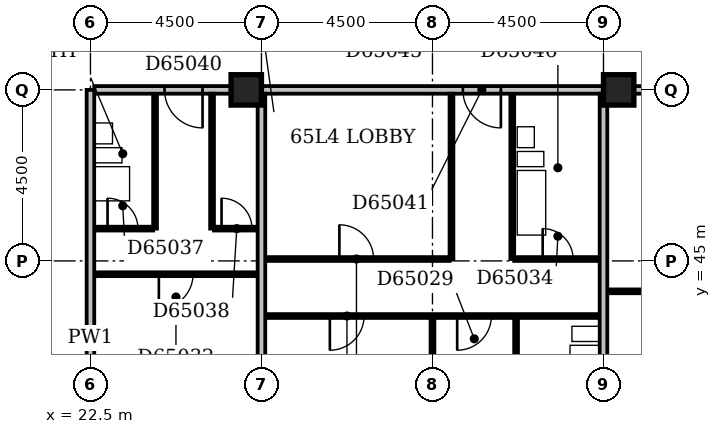
"""IFC4 building model, lengths in metres.
Left out: names, types, materials, properties, quantities, classifications, styles, units other than length and angle.
Written with IfcOpenShell. Run it as: python <this file> out.ifc"""

import sys

from ifc_helpers import new_model, si_unit, direction, frame, frame_2d, origin, origin_2d, place, context, subcontext, project, spatial, rectangle, extrude, element, fill, save


model = new_model("IFC4")
c1 = context("Model", 3, precision=1e-05, world=origin(), true_north=direction((0.0, 1.0)))
c2 = subcontext(c1, "Body", "Model", "MODEL_VIEW")
j1 = project(units=[si_unit("LENGTHUNIT", "METRE"), si_unit("PLANEANGLEUNIT", "RADIAN")], contexts=[c1])
p1 = place(None, origin())
s1 = spatial("IfcSite", under=j1, at=p1, CompositionType="ELEMENT")
p2 = place(p1, origin())
s2 = spatial("IfcBuilding", under=s1, at=p2, CompositionType="ELEMENT")
p3 = place(p2, frame((0.0, 0.0, 251.0)))
s3 = spatial("IfcBuildingStorey", under=s2, at=p3, CompositionType="ELEMENT", Elevation=251.0)
for number, where, z_axis, x_axis in (
    (1, (26.6, 49.5, -0.3), (0.0, 0.0, 1.0), (1.0, 0.0, 0.0)),
    (2, (36.4, 49.5, -0.3), (0.0, 0.0, 1.0), (1.0, 0.0, 0.0)),
):
    element("IfcColumn", number, at=place(p3, frame(where, z_axis=z_axis, x_axis=x_axis)), inside=s3, PredefinedType="COLUMN", context=c2, shape_type="SweptSolid", body=[
        extrude(rectangle(XDim=0.8, YDim=0.8, at=origin_2d()), origin(), (0.0, 0.0, 1.0), 3.6),
    ])
p4 = place(p3, frame((22.5, 36.45, 0.0), z_axis=(0.0, 0.0, 1.0), x_axis=(0.0, 1.0, 0.0)))
e3 = element("IfcWall", 3, at=p4, inside=s3, PredefinedType="PARTITIONING", context=c2, shape_type="SweptSolid", body=[
    extrude(rectangle(XDim=13.05, YDim=0.2, at=frame_2d((6.525, 0.0))), origin(), (0.0, 0.0, 1.0), 3.3),
])
p5 = place(p3, frame((27.0, 36.45, 0.0), z_axis=(0.0, 0.0, 1.0), x_axis=(0.0, 1.0, 0.0)))
e4 = element("IfcWall", 4, at=p5, inside=s3, PredefinedType="PARTITIONING", context=c2, shape_type="SweptSolid", body=[
    extrude(rectangle(XDim=12.95, YDim=0.2, at=frame_2d((6.475, 0.0))), origin(), (0.0, 0.0, 1.0), 3.3),
])
p6 = place(p3, frame((31.5, 36.45, 0.0), z_axis=(0.0, 0.0, 1.0), x_axis=(0.0, 1.0, 0.0)))
e5 = element("IfcWall", 5, at=p6, inside=s3, PredefinedType="PARTITIONING", context=c2, shape_type="SweptSolid", body=[
    extrude(rectangle(XDim=7.05, YDim=0.1, at=frame_2d((3.525, 0.0))), origin(), (0.0, 0.0, 1.0), 3.3),
])
p7 = place(p3, frame((36.0, 36.45, 0.0), z_axis=(0.0, 0.0, 1.0), x_axis=(0.0, 1.0, 0.0)))
e6 = element("IfcWall", 6, at=p7, inside=s3, PredefinedType="PARTITIONING", context=c2, shape_type="SweptSolid", body=[
    extrude(rectangle(XDim=12.95, YDim=0.2, at=frame_2d((6.475, 0.0))), origin(), (0.0, 0.0, 1.0), 3.3),
])
p8 = place(p3, frame((33.7, 40.65, 0.0), z_axis=(0.0, 0.0, 1.0), x_axis=(0.0, 1.0, 0.0)))
e7 = element("IfcWall", 7, at=p8, inside=s3, PredefinedType="PLUMBINGWALL", context=c2, shape_type="SweptSolid", body=[
    extrude(rectangle(XDim=2.85, YDim=0.1, at=frame_2d((1.425, 0.0))), origin(), (0.0, 0.0, 1.0), 3.3),
])
p9 = place(p8, frame((1.05, 0.0, 0.0)))
e8 = element("IfcOpeningElement", 8, at=p9, cuts=e7, PredefinedType="OPENING", context=c2, shape_type="SweptSolid", body=[
    extrude(rectangle(XDim=0.8, YDim=2.1, at=frame_2d((0.4, 1.05))), frame((0.0, 0.062, 0.0), z_axis=(0.0, -1.0, 0.0), x_axis=(1.0, 0.0, 0.0)), (0.0, 0.0, 1.0), 0.124),
])
p10 = place(p3, frame((27.1, 43.55, 0.0), z_axis=(0.0, 0.0, 1.0), x_axis=(1.0, 0.0, 0.0)))
e9 = element("IfcWall", 9, at=p10, inside=s3, PredefinedType="PARTITIONING", context=c2, shape_type="SweptSolid", body=[
    extrude(rectangle(XDim=8.8, YDim=0.1, at=frame_2d((4.4, 0.0))), origin(), (0.0, 0.0, 1.0), 3.3),
])
p11 = place(p10, frame((1.7, 0.0, 0.0)))
e10 = element("IfcOpeningElement", 10, at=p11, cuts=e9, PredefinedType="OPENING", context=c2, shape_type="SweptSolid", body=[
    extrude(rectangle(XDim=0.9, YDim=2.1, at=frame_2d((0.45, 1.05))), frame((0.0, 0.062, 0.0), z_axis=(0.0, -1.0, 0.0), x_axis=(1.0, 0.0, 0.0)), (0.0, 0.0, 1.0), 0.124),
])
p12 = place(p10, frame((5.05, 0.0, 0.0)))
e11 = element("IfcOpeningElement", 11, at=p12, cuts=e9, PredefinedType="OPENING", context=c2, shape_type="SweptSolid", body=[
    extrude(rectangle(XDim=0.9, YDim=2.1, at=frame_2d((0.45, 1.05))), frame((0.0, 0.062, 0.0), z_axis=(0.0, -1.0, 0.0), x_axis=(1.0, 0.0, 0.0)), (0.0, 0.0, 1.0), 0.124),
])
p13 = place(p3, frame((36.1, 44.2, 0.0), z_axis=(0.0, 0.0, 1.0), x_axis=(1.0, 0.0, 0.0)))
e12 = element("IfcWall", 12, at=p13, inside=s3, PredefinedType="PARTITIONING", context=c2, shape_type="SweptSolid", body=[
    extrude(rectangle(XDim=9.5, YDim=0.1, at=frame_2d((4.75, 0.0))), origin(), (0.0, 0.0, 1.0), 3.3),
])
p14 = place(p13, frame((1.7, 0.0, 0.0)))
e13 = element("IfcOpeningElement", 13, at=p14, cuts=e12, PredefinedType="OPENING", context=c2, shape_type="SweptSolid", body=[
    extrude(rectangle(XDim=0.9, YDim=2.1, at=frame_2d((0.45, 1.05))), frame((0.0, 0.062, 0.0), z_axis=(0.0, -1.0, 0.0), x_axis=(1.0, 0.0, 0.0)), (0.0, 0.0, 1.0), 0.124),
])
p15 = place(p13, frame((6.2, 0.0, 0.0)))
e14 = element("IfcOpeningElement", 14, at=p15, cuts=e12, PredefinedType="OPENING", context=c2, shape_type="SweptSolid", body=[
    extrude(rectangle(XDim=0.9, YDim=2.1, at=frame_2d((0.45, 1.05))), frame((0.0, 0.062, 0.0), z_axis=(0.0, -1.0, 0.0), x_axis=(1.0, 0.0, 0.0)), (0.0, 0.0, 1.0), 0.124),
])
p16 = place(p3, frame((22.6, 44.65, 0.0), z_axis=(0.0, 0.0, 1.0), x_axis=(1.0, 0.0, 0.0)))
e15 = element("IfcWall", 15, at=p16, inside=s3, PredefinedType="PARTITIONING", context=c2, shape_type="SweptSolid", body=[
    extrude(rectangle(XDim=4.3, YDim=0.1, at=frame_2d((2.15, 0.0))), origin(), (0.0, 0.0, 1.0), 3.3),
])
p17 = place(p16, frame((1.7, 0.0, 0.0)))
e16 = element("IfcOpeningElement", 16, at=p17, cuts=e15, PredefinedType="OPENING", context=c2, shape_type="SweptSolid", body=[
    extrude(rectangle(XDim=0.9, YDim=2.1, at=frame_2d((0.45, 1.05))), frame((0.0, 0.062, 0.0), z_axis=(0.0, -1.0, 0.0), x_axis=(1.0, 0.0, 0.0)), (0.0, 0.0, 1.0), 0.124),
])
p18 = place(p3, frame((27.1, 45.05, 0.0), z_axis=(0.0, 0.0, 1.0), x_axis=(1.0, 0.0, 0.0)))
e17 = element("IfcWall", 17, at=p18, inside=s3, PredefinedType="PARTITIONING", context=c2, shape_type="SweptSolid", body=[
    extrude(rectangle(XDim=4.85, YDim=0.1, at=frame_2d((2.425, 0.0))), origin(), (0.0, 0.0, 1.0), 3.3),
])
p19 = place(p18, frame((1.95, 0.0, 0.0)))
e18 = element("IfcOpeningElement", 18, at=p19, cuts=e17, PredefinedType="OPENING", context=c2, shape_type="SweptSolid", body=[
    extrude(rectangle(XDim=0.9, YDim=2.1, at=frame_2d((0.45, 1.05))), frame((0.0, 0.062, 0.0), z_axis=(0.0, -1.0, 0.0), x_axis=(1.0, 0.0, 0.0)), (0.0, 0.0, 1.0), 0.124),
])
p20 = place(p3, frame((32.0, 45.05, 0.0), z_axis=(0.0, 0.0, 1.0), x_axis=(0.0, 1.0, 0.0)))
e19 = element("IfcWall", 19, at=p20, inside=s3, PredefinedType="PARTITIONING", context=c2, shape_type="SweptSolid", body=[
    extrude(rectangle(XDim=4.35, YDim=0.1, at=frame_2d((2.175, 0.0))), origin(), (0.0, 0.0, 1.0), 3.3),
])
p21 = place(p3, frame((33.6, 45.05, 0.0), z_axis=(0.0, 0.0, 1.0), x_axis=(0.0, 1.0, 0.0)))
e20 = element("IfcWall", 20, at=p21, inside=s3, PredefinedType="PLUMBINGWALL", context=c2, shape_type="SweptSolid", body=[
    extrude(rectangle(XDim=4.35, YDim=0.1, at=frame_2d((2.175, 0.0))), origin(), (0.0, 0.0, 1.0), 3.3),
])
p22 = place(p3, frame((33.65, 45.05, 0.0), z_axis=(0.0, 0.0, 1.0), x_axis=(1.0, 0.0, 0.0)))
e21 = element("IfcWall", 21, at=p22, inside=s3, PredefinedType="PARTITIONING", context=c2, shape_type="SweptSolid", body=[
    extrude(rectangle(XDim=2.25, YDim=0.1, at=frame_2d((1.125, 0.0))), origin(), (0.0, 0.0, 1.0), 3.3),
])
p23 = place(p22, frame((0.75, 0.0, 0.0)))
e22 = element("IfcOpeningElement", 22, at=p23, cuts=e21, PredefinedType="OPENING", context=c2, shape_type="SweptSolid", body=[
    extrude(rectangle(XDim=0.8, YDim=2.1, at=frame_2d((0.4, 1.05))), frame((0.0, 0.062, 0.0), z_axis=(0.0, -1.0, 0.0), x_axis=(1.0, 0.0, 0.0)), (0.0, 0.0, 1.0), 0.124),
])
p24 = place(p3, frame((22.6, 45.85, 0.0), z_axis=(0.0, 0.0, 1.0), x_axis=(1.0, 0.0, 0.0)))
e23 = element("IfcWall", 23, at=p24, inside=s3, PredefinedType="PARTITIONING", context=c2, shape_type="SweptSolid", body=[
    extrude(rectangle(XDim=1.55, YDim=0.1, at=frame_2d((0.775, 0.0))), origin(), (0.0, 0.0, 1.0), 3.3),
])
p25 = place(p24, frame((0.35, 0.0, 0.0)))
e24 = element("IfcOpeningElement", 24, at=p25, cuts=e23, PredefinedType="OPENING", context=c2, shape_type="SweptSolid", body=[
    extrude(rectangle(XDim=0.8, YDim=2.1, at=frame_2d((0.4, 1.05))), frame((0.0, 0.062, 0.0), z_axis=(0.0, -1.0, 0.0), x_axis=(1.0, 0.0, 0.0)), (0.0, 0.0, 1.0), 0.124),
])
p26 = place(p3, frame((24.2, 45.85, 0.0), z_axis=(0.0, 0.0, 1.0), x_axis=(0.0, 1.0, 0.0)))
e25 = element("IfcWall", 25, at=p26, inside=s3, PredefinedType="PLUMBINGWALL", context=c2, shape_type="SweptSolid", body=[
    extrude(rectangle(XDim=3.55, YDim=0.1, at=frame_2d((1.775, 0.0))), origin(), (0.0, 0.0, 1.0), 3.3),
])
p27 = place(p3, frame((25.7, 45.85, 0.0), z_axis=(0.0, 0.0, 1.0), x_axis=(0.0, 1.0, 0.0)))
e26 = element("IfcWall", 26, at=p27, inside=s3, PredefinedType="PARTITIONING", context=c2, shape_type="SweptSolid", body=[
    extrude(rectangle(XDim=3.55, YDim=0.1, at=frame_2d((1.775, 0.0))), origin(), (0.0, 0.0, 1.0), 3.3),
])
p28 = place(p3, frame((25.75, 45.85, 0.0), z_axis=(0.0, 0.0, 1.0), x_axis=(1.0, 0.0, 0.0)))
e27 = element("IfcWall", 27, at=p28, inside=s3, PredefinedType="PARTITIONING", context=c2, shape_type="SweptSolid", body=[
    extrude(rectangle(XDim=1.15, YDim=0.1, at=frame_2d((0.575, 0.0))), origin(), (0.0, 0.0, 1.0), 3.3),
])
p29 = place(p28, frame((0.2, 0.0, 0.0)))
e28 = element("IfcOpeningElement", 28, at=p29, cuts=e27, PredefinedType="OPENING", context=c2, shape_type="SweptSolid", body=[
    extrude(rectangle(XDim=0.8, YDim=2.1, at=frame_2d((0.4, 1.05))), frame((0.0, 0.062, 0.0), z_axis=(0.0, -1.0, 0.0), x_axis=(1.0, 0.0, 0.0)), (0.0, 0.0, 1.0), 0.124),
])
p30 = place(p3, frame((22.6, 49.5, 0.0), z_axis=(0.0, 0.0, 1.0), x_axis=(1.0, 0.0, 0.0)))
e29 = element("IfcWall", 29, at=p30, inside=s3, PredefinedType="PARTITIONING", context=c2, shape_type="SweptSolid", body=[
    extrude(rectangle(XDim=21.95, YDim=0.2, at=frame_2d((10.975, 0.0))), origin(), (0.0, 0.0, 1.0), 3.3),
])
p31 = place(p30, frame((1.85, 0.0, 0.0)))
e30 = element("IfcOpeningElement", 30, at=p31, cuts=e29, PredefinedType="OPENING", context=c2, shape_type="SweptSolid", body=[
    extrude(rectangle(XDim=1.0, YDim=2.1, at=frame_2d((0.5, 1.05))), frame((0.0, 0.112, 0.0), z_axis=(0.0, -1.0, 0.0), x_axis=(1.0, 0.0, 0.0)), (0.0, 0.0, 1.0), 0.224),
])
p32 = place(p30, frame((9.7, 0.0, 0.0)))
e31 = element("IfcOpeningElement", 31, at=p32, cuts=e29, PredefinedType="OPENING", context=c2, shape_type="SweptSolid", body=[
    extrude(rectangle(XDim=1.0, YDim=2.1, at=frame_2d((0.5, 1.05))), frame((0.0, 0.112, 0.0), z_axis=(0.0, -1.0, 0.0), x_axis=(1.0, 0.0, 0.0)), (0.0, 0.0, 1.0), 0.224),
])
p33 = place(p30, frame((15.05, 0.0, 0.0)))
e32 = element("IfcOpeningElement", 32, at=p33, cuts=e29, PredefinedType="OPENING", context=c2, shape_type="SweptSolid", body=[
    extrude(rectangle(XDim=1.0, YDim=2.1, at=frame_2d((0.5, 1.05))), frame((0.0, 0.112, 0.0), z_axis=(0.0, -1.0, 0.0), x_axis=(1.0, 0.0, 0.0)), (0.0, 0.0, 1.0), 0.224),
])
p34 = place(p11, frame((0.9, 0.0, 0.0), z_axis=(0.0, 0.0, 1.0), x_axis=(-1.0, 0.0, 0.0)))
e33 = element("IfcDoor", 33, at=p34, inside=s3, OperationType="SINGLE_SWING_RIGHT", PredefinedType="DOOR", context=c2, shape_type="SweptSolid", body=[
    extrude(rectangle(XDim=0.9, YDim=2.1, at=frame_2d((0.45, 1.05))), frame((0.0, 0.025, 0.0), z_axis=(0.0, -1.0, 0.0), x_axis=(1.0, 0.0, 0.0)), (0.0, 0.0, 1.0), 0.05),
])
fill(e10, e33)
p35 = place(p12, frame((0.9, 0.0, 0.0), z_axis=(0.0, 0.0, 1.0), x_axis=(-1.0, 0.0, 0.0)))
e34 = element("IfcDoor", 34, at=p35, inside=s3, OperationType="SINGLE_SWING_RIGHT", PredefinedType="DOOR", context=c2, shape_type="SweptSolid", body=[
    extrude(rectangle(XDim=0.9, YDim=2.1, at=frame_2d((0.45, 1.05))), frame((0.0, 0.025, 0.0), z_axis=(0.0, -1.0, 0.0), x_axis=(1.0, 0.0, 0.0)), (0.0, 0.0, 1.0), 0.05),
])
fill(e11, e34)
p36 = place(p17, frame((0.9, 0.0, 0.0), z_axis=(0.0, 0.0, 1.0), x_axis=(-1.0, 0.0, 0.0)))
e35 = element("IfcDoor", 35, at=p36, inside=s3, OperationType="SINGLE_SWING_RIGHT", PredefinedType="DOOR", context=c2, shape_type="SweptSolid", body=[
    extrude(rectangle(XDim=0.9, YDim=2.1, at=frame_2d((0.45, 1.05))), frame((0.0, 0.025, 0.0), z_axis=(0.0, -1.0, 0.0), x_axis=(1.0, 0.0, 0.0)), (0.0, 0.0, 1.0), 0.05),
])
fill(e16, e35)
p37 = place(p19, origin())
e36 = element("IfcDoor", 36, at=p37, inside=s3, OperationType="SINGLE_SWING_LEFT", PredefinedType="DOOR", context=c2, shape_type="SweptSolid", body=[
    extrude(rectangle(XDim=0.9, YDim=2.1, at=frame_2d((0.45, 1.05))), frame((0.0, 0.025, 0.0), z_axis=(0.0, -1.0, 0.0), x_axis=(1.0, 0.0, 0.0)), (0.0, 0.0, 1.0), 0.05),
])
fill(e18, e36)
p38 = place(p23, origin())
e37 = element("IfcDoor", 37, at=p38, inside=s3, OperationType="SINGLE_SWING_LEFT", PredefinedType="DOOR", context=c2, shape_type="SweptSolid", body=[
    extrude(rectangle(XDim=0.8, YDim=2.1, at=frame_2d((0.4, 1.05))), frame((0.0, 0.025, 0.0), z_axis=(0.0, -1.0, 0.0), x_axis=(1.0, 0.0, 0.0)), (0.0, 0.0, 1.0), 0.05),
])
fill(e22, e37)
p39 = place(p25, origin())
e38 = element("IfcDoor", 38, at=p39, inside=s3, OperationType="SINGLE_SWING_LEFT", PredefinedType="DOOR", context=c2, shape_type="SweptSolid", body=[
    extrude(rectangle(XDim=0.8, YDim=2.1, at=frame_2d((0.4, 1.05))), frame((0.0, 0.025, 0.0), z_axis=(0.0, -1.0, 0.0), x_axis=(1.0, 0.0, 0.0)), (0.0, 0.0, 1.0), 0.05),
])
fill(e24, e38)
p40 = place(p29, origin())
e39 = element("IfcDoor", 39, at=p40, inside=s3, OperationType="SINGLE_SWING_LEFT", PredefinedType="DOOR", context=c2, shape_type="SweptSolid", body=[
    extrude(rectangle(XDim=0.8, YDim=2.1, at=frame_2d((0.4, 1.05))), frame((0.0, 0.025, 0.0), z_axis=(0.0, -1.0, 0.0), x_axis=(1.0, 0.0, 0.0)), (0.0, 0.0, 1.0), 0.05),
])
fill(e28, e39)
p41 = place(p31, origin())
e40 = element("IfcDoor", 40, at=p41, inside=s3, OperationType="SINGLE_SWING_RIGHT", PredefinedType="DOOR", context=c2, shape_type="SweptSolid", body=[
    extrude(rectangle(XDim=1.0, YDim=2.1, at=frame_2d((0.5, 1.05))), frame((0.0, 0.025, 0.0), z_axis=(0.0, -1.0, 0.0), x_axis=(1.0, 0.0, 0.0)), (0.0, 0.0, 1.0), 0.05),
])
fill(e30, e40)
p42 = place(p32, origin())
e41 = element("IfcDoor", 41, at=p42, inside=s3, OperationType="SINGLE_SWING_RIGHT", PredefinedType="DOOR", context=c2, shape_type="SweptSolid", body=[
    extrude(rectangle(XDim=1.0, YDim=2.1, at=frame_2d((0.5, 1.05))), frame((0.0, 0.025, 0.0), z_axis=(0.0, -1.0, 0.0), x_axis=(1.0, 0.0, 0.0)), (0.0, 0.0, 1.0), 0.05),
])
fill(e31, e41)
save(model, sys.argv[1])
